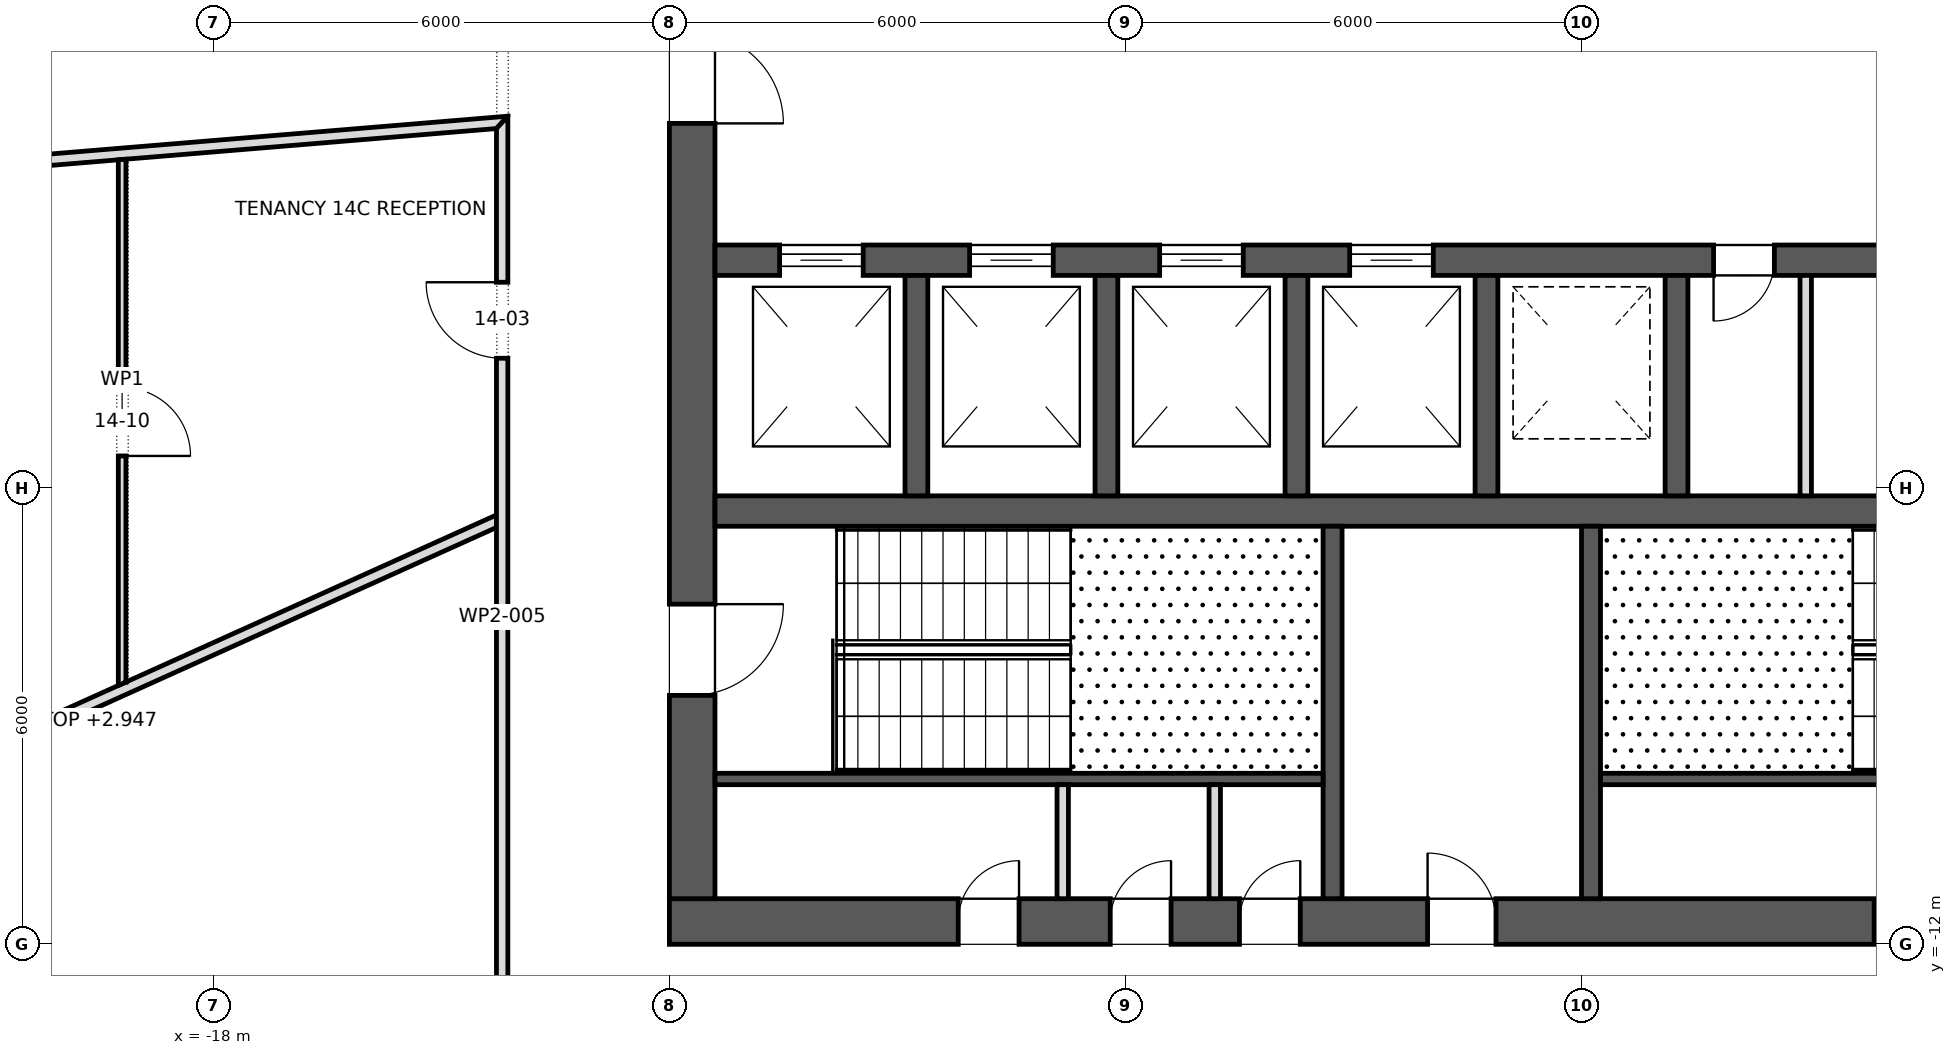
"""IFC4 building model, lengths in metres.
Left out: names, types, materials, properties, quantities, classifications, styles, units other than length and angle.
Written with IfcOpenShell. Run it as: python <this file> out.ifc"""

import sys

from ifc_helpers import new_model, si_unit, direction, frame, frame_2d, origin, place, context, subcontext, project, spatial, polyline, rectangle, outline, extrude, element, fill, save


model = new_model("IFC4")
c1 = context("Model", 3, precision=1e-05, world=origin(), true_north=direction((0.0, 1.0)))
c2 = subcontext(c1, "Body", "Model", "MODEL_VIEW")
j1 = project(units=[si_unit("LENGTHUNIT", "METRE"), si_unit("PLANEANGLEUNIT", "RADIAN")], contexts=[c1])
p1 = place(None, origin())
s1 = spatial("IfcSite", under=j1, at=p1, CompositionType="ELEMENT")
p2 = place(p1, origin())
s2 = spatial("IfcBuilding", under=s1, at=p2, CompositionType="ELEMENT")
p3 = place(p2, frame((0.0, 0.0, 202.9)))
s3 = spatial("IfcBuildingStorey", under=s2, at=p3, CompositionType="ELEMENT", Elevation=202.9)
p4 = place(p3, frame((-12.0, -11.7, 0.0), z_axis=(0.0, 0.0, 1.0), x_axis=(1.0, 0.0, 0.0)))
e1 = element("IfcWall", 1, at=p4, inside=s3, PredefinedType="SHEAR", context=c2, shape_type="SweptSolid", body=[
    extrude(rectangle(XDim=24.0, YDim=0.6, at=frame_2d((12.0, 0.0))), origin(), (0.0, 0.0, 1.0), 4.0),
])
p5 = place(p4, frame((9.975, 0.0, 0.0)))
e2 = element("IfcOpeningElement", 2, at=p5, cuts=e1, PredefinedType="OPENING", context=c2, shape_type="SweptSolid", body=[
    extrude(rectangle(XDim=0.9, YDim=2.1, at=frame_2d((0.45, 1.05))), frame((0.0, 0.312, 0.0), z_axis=(0.0, -1.0, 0.0), x_axis=(1.0, 0.0, 0.0)), (0.0, 0.0, 1.0), 0.624),
])
p6 = place(p4, frame((3.8, 0.0, 0.0)))
e3 = element("IfcOpeningElement", 3, at=p6, cuts=e1, PredefinedType="OPENING", context=c2, shape_type="SweptSolid", body=[
    extrude(rectangle(XDim=0.8, YDim=2.1, at=frame_2d((0.4, 1.05))), frame((0.0, 0.312, 0.0), z_axis=(0.0, -1.0, 0.0), x_axis=(1.0, 0.0, 0.0)), (0.0, 0.0, 1.0), 0.624),
])
p7 = place(p4, frame((5.8, 0.0, 0.0)))
e4 = element("IfcOpeningElement", 4, at=p7, cuts=e1, PredefinedType="OPENING", context=c2, shape_type="SweptSolid", body=[
    extrude(rectangle(XDim=0.8, YDim=2.1, at=frame_2d((0.4, 1.05))), frame((0.0, 0.312, 0.0), z_axis=(0.0, -1.0, 0.0), x_axis=(1.0, 0.0, 0.0)), (0.0, 0.0, 1.0), 0.624),
])
p8 = place(p4, frame((7.5, 0.0, 0.0)))
e5 = element("IfcOpeningElement", 5, at=p8, cuts=e1, PredefinedType="OPENING", context=c2, shape_type="SweptSolid", body=[
    extrude(rectangle(XDim=0.8, YDim=2.1, at=frame_2d((0.4, 1.05))), frame((0.0, 0.312, 0.0), z_axis=(0.0, -1.0, 0.0), x_axis=(1.0, 0.0, 0.0)), (0.0, 0.0, 1.0), 0.624),
])
p9 = place(p4, frame((15.85, 0.0, 0.0)))
e6 = element("IfcOpeningElement", 6, at=p9, cuts=e1, PredefinedType="OPENING", context=c2, shape_type="SweptSolid", body=[
    extrude(rectangle(XDim=0.8, YDim=2.1, at=frame_2d((0.4, 1.05))), frame((0.0, 0.312, 0.0), z_axis=(0.0, -1.0, 0.0), x_axis=(1.0, 0.0, 0.0)), (0.0, 0.0, 1.0), 0.624),
])
p10 = place(p3, frame((-11.7, -11.4, 0.0), z_axis=(0.0, 0.0, 1.0), x_axis=(0.0, 1.0, 0.0)))
e7 = element("IfcWall", 7, at=p10, inside=s3, PredefinedType="SHEAR", context=c2, shape_type="SweptSolid", body=[
    extrude(rectangle(XDim=22.8, YDim=0.6, at=frame_2d((11.4, 0.0))), origin(), (0.0, 0.0, 1.0), 4.0),
])
p11 = place(p10, frame((10.2, 0.0, 0.0)))
e8 = element("IfcOpeningElement", 8, at=p11, cuts=e7, PredefinedType="OPENING", context=c2, shape_type="SweptSolid", body=[
    extrude(rectangle(XDim=2.4, YDim=2.1, at=frame_2d((1.2, 1.05))), frame((0.0, 0.312, 0.0), z_axis=(0.0, -1.0, 0.0), x_axis=(1.0, 0.0, 0.0)), (0.0, 0.0, 1.0), 0.624),
])
p12 = place(p10, frame((18.925, 0.0, 0.0)))
e9 = element("IfcOpeningElement", 9, at=p12, cuts=e7, PredefinedType="OPENING", context=c2, shape_type="SweptSolid", body=[
    extrude(rectangle(XDim=1.2, YDim=2.1, at=frame_2d((0.6, 1.05))), frame((0.0, 0.312, 0.0), z_axis=(0.0, -1.0, 0.0), x_axis=(1.0, 0.0, 0.0)), (0.0, 0.0, 1.0), 0.624),
])
p13 = place(p10, frame((2.675, 0.0, 0.0)))
e10 = element("IfcOpeningElement", 10, at=p13, cuts=e7, PredefinedType="OPENING", context=c2, shape_type="SweptSolid", body=[
    extrude(rectangle(XDim=1.2, YDim=2.1, at=frame_2d((0.6, 1.05))), frame((0.0, 0.312, 0.0), z_axis=(0.0, -1.0, 0.0), x_axis=(1.0, 0.0, 0.0)), (0.0, 0.0, 1.0), 0.624),
])
p14 = place(p3, frame((-11.4, -3.0, 0.0), z_axis=(0.0, 0.0, 1.0), x_axis=(1.0, 0.0, 0.0)))
e11 = element("IfcWall", 11, at=p14, inside=s3, PredefinedType="SHEAR", context=c2, shape_type="SweptSolid", body=[
    extrude(rectangle(XDim=22.8, YDim=0.4, at=frame_2d((11.4, 0.0))), origin(), (0.0, 0.0, 1.0), 4.0),
])
p15 = place(p14, frame((0.85, 0.0, 0.0)))
e12 = element("IfcOpeningElement", 12, at=p15, cuts=e11, PredefinedType="OPENING", context=c2, shape_type="SweptSolid", body=[
    extrude(rectangle(XDim=1.1, YDim=2.1, at=frame_2d((0.55, 1.05))), frame((0.0, 0.212, 0.0), z_axis=(0.0, -1.0, 0.0), x_axis=(1.0, 0.0, 0.0)), (0.0, 0.0, 1.0), 0.424),
])
p16 = place(p14, frame((3.35, 0.0, 0.0)))
e13 = element("IfcOpeningElement", 13, at=p16, cuts=e11, PredefinedType="OPENING", context=c2, shape_type="SweptSolid", body=[
    extrude(rectangle(XDim=1.1, YDim=2.1, at=frame_2d((0.55, 1.05))), frame((0.0, 0.212, 0.0), z_axis=(0.0, -1.0, 0.0), x_axis=(1.0, 0.0, 0.0)), (0.0, 0.0, 1.0), 0.424),
])
p17 = place(p14, frame((5.85, 0.0, 0.0)))
e14 = element("IfcOpeningElement", 14, at=p17, cuts=e11, PredefinedType="OPENING", context=c2, shape_type="SweptSolid", body=[
    extrude(rectangle(XDim=1.1, YDim=2.1, at=frame_2d((0.55, 1.05))), frame((0.0, 0.212, 0.0), z_axis=(0.0, -1.0, 0.0), x_axis=(1.0, 0.0, 0.0)), (0.0, 0.0, 1.0), 0.424),
])
p18 = place(p14, frame((8.35, 0.0, 0.0)))
e15 = element("IfcOpeningElement", 15, at=p18, cuts=e11, PredefinedType="OPENING", context=c2, shape_type="SweptSolid", body=[
    extrude(rectangle(XDim=1.1, YDim=2.1, at=frame_2d((0.55, 1.05))), frame((0.0, 0.212, 0.0), z_axis=(0.0, -1.0, 0.0), x_axis=(1.0, 0.0, 0.0)), (0.0, 0.0, 1.0), 0.424),
])
p19 = place(p14, frame((18.35, 0.0, 0.0)))
e16 = element("IfcOpeningElement", 16, at=p19, cuts=e11, PredefinedType="OPENING", context=c2, shape_type="SweptSolid", body=[
    extrude(rectangle(XDim=1.1, YDim=2.1, at=frame_2d((0.55, 1.05))), frame((0.0, 0.212, 0.0), z_axis=(0.0, -1.0, 0.0), x_axis=(1.0, 0.0, 0.0)), (0.0, 0.0, 1.0), 0.424),
])
p20 = place(p14, frame((13.137, 0.0, 0.0)))
e17 = element("IfcOpeningElement", 17, at=p20, cuts=e11, PredefinedType="OPENING", context=c2, shape_type="SweptSolid", body=[
    extrude(rectangle(XDim=0.8, YDim=2.1, at=frame_2d((0.4, 1.05))), frame((0.0, 0.212, 0.0), z_axis=(0.0, -1.0, 0.0), x_axis=(1.0, 0.0, 0.0)), (0.0, 0.0, 1.0), 0.424),
])
p21 = place(p14, frame((15.512, 0.0, 0.0)))
e18 = element("IfcOpeningElement", 18, at=p21, cuts=e11, PredefinedType="OPENING", context=c2, shape_type="SweptSolid", body=[
    extrude(rectangle(XDim=0.9, YDim=2.1, at=frame_2d((0.45, 1.05))), frame((0.0, 0.212, 0.0), z_axis=(0.0, -1.0, 0.0), x_axis=(1.0, 0.0, 0.0)), (0.0, 0.0, 1.0), 0.424),
])
p22 = place(p3, frame((-11.4, -6.3, 0.0), z_axis=(0.0, 0.0, 1.0), x_axis=(1.0, 0.0, 0.0)))
e19 = element("IfcWall", 19, at=p22, inside=s3, PredefinedType="SHEAR", context=c2, shape_type="SweptSolid", body=[
    extrude(rectangle(XDim=22.8, YDim=0.4, at=frame_2d((11.4, 0.0))), origin(), (0.0, 0.0, 1.0), 4.0),
])
p23 = place(p22, frame((20.85, 0.0, 0.0)))
e20 = element("IfcOpeningElement", 20, at=p23, cuts=e19, PredefinedType="OPENING", context=c2, shape_type="SweptSolid", body=[
    extrude(rectangle(XDim=1.1, YDim=2.1, at=frame_2d((0.55, 1.05))), frame((0.0, 0.212, 0.0), z_axis=(0.0, -1.0, 0.0), x_axis=(1.0, 0.0, 0.0)), (0.0, 0.0, 1.0), 0.424),
])
for number, where, z_axis, x_axis in (
    (21, (-8.75, -6.1, 0.0), (0.0, 0.0, 1.0), (0.0, 1.0, 0.0)),
    (22, (-6.25, -6.1, 0.0), (0.0, 0.0, 1.0), (0.0, 1.0, 0.0)),
    (23, (-3.75, -6.1, 0.0), (0.0, 0.0, 1.0), (0.0, 1.0, 0.0)),
    (24, (-1.25, -6.1, 0.0), (0.0, 0.0, 1.0), (0.0, 1.0, 0.0)),
    (25, (1.25, -6.1, 0.0), (0.0, 0.0, 1.0), (0.0, 1.0, 0.0)),
):
    element("IfcWall", number, at=place(p3, frame(where, z_axis=z_axis, x_axis=x_axis)), inside=s3, PredefinedType="SHEAR", context=c2, shape_type="SweptSolid", body=[
        extrude(rectangle(XDim=2.9, YDim=0.3, at=frame_2d((1.45, 0.0))), origin(), (0.0, 0.0, 1.0), 4.0),
    ])
for number, where, z_axis, x_axis in (
    (26, (-3.275, -11.4, 0.0), (0.0, 0.0, 1.0), (0.0, 1.0, 0.0)),
    (27, (0.125, -11.4, 0.0), (0.0, 0.0, 1.0), (0.0, 1.0, 0.0)),
):
    element("IfcWall", number, at=place(p3, frame(where, z_axis=z_axis, x_axis=x_axis)), inside=s3, PredefinedType="SHEAR", context=c2, shape_type="SweptSolid", body=[
        extrude(rectangle(XDim=4.9, YDim=0.25, at=frame_2d((2.45, 0.0))), origin(), (0.0, 0.0, 1.0), 3.7),
    ])
for number, where, z_axis, x_axis in (
    (28, (-11.4, -9.825, 0.0), (0.0, 0.0, 1.0), (1.0, 0.0, 0.0)),
    (29, (0.25, -9.825, 0.0), (0.0, 0.0, 1.0), (1.0, 0.0, 0.0)),
):
    element("IfcWall", number, at=place(p3, frame(where, z_axis=z_axis, x_axis=x_axis)), inside=s3, PredefinedType="SHEAR", context=c2, shape_type="SweptSolid", body=[
        extrude(rectangle(XDim=8.0, YDim=0.15, at=frame_2d((4.0, 0.0))), origin(), (0.0, 0.0, 1.0), 3.7),
    ])
for number, where, z_axis, x_axis in (
    (30, (-6.825, -11.4, 0.0), (0.0, 0.0, 1.0), (0.0, 1.0, 0.0)),
    (31, (-4.825, -11.4, 0.0), (0.0, 0.0, 1.0), (0.0, 1.0, 0.0)),
):
    element("IfcWall", number, at=place(p3, frame(where, z_axis=z_axis, x_axis=x_axis)), inside=s3, PredefinedType="PARTITIONING", context=c2, shape_type="SweptSolid", body=[
        extrude(rectangle(XDim=1.5, YDim=0.15, at=frame_2d((0.75, 0.0))), origin(), (0.0, 0.0, 1.0), 3.7),
    ])
p24 = place(p3, frame((2.95, -6.1, 0.0), z_axis=(0.0, 0.0, 1.0), x_axis=(0.0, 1.0, 0.0)))
e32 = element("IfcWall", 32, at=p24, inside=s3, PredefinedType="PARTITIONING", context=c2, shape_type="SweptSolid", body=[
    extrude(rectangle(XDim=2.9, YDim=0.15, at=frame_2d((1.45, 0.0))), origin(), (0.0, 0.0, 1.0), 3.7),
])
p25 = place(p3, frame((-29.288, -2.434, 0.0), z_axis=(0.0, 0.0, 1.0), x_axis=(0.9965984313, 0.082410962436, 0.0)))
e33 = element("IfcWall", 33, at=p25, inside=s3, PredefinedType="PARTITIONING", context=c2, shape_type="SweptSolid", body=[
    extrude(outline(polyline([(0.005, -0.075), (1.886, -0.075), (3.768, -0.075), (5.65, -0.075), (7.531, -0.075), (9.413, -0.075), (11.295, -0.075), (13.177, -0.075), (15.059, -0.075), (15.221, 0.075), (15.221, 0.075), (13.319, 0.075), (11.416, 0.075), (9.513, 0.075), (7.611, 0.075), (5.708, 0.075), (3.805, 0.075), (1.903, 0.075), (0.0, 0.075), (0.0, -0.044), (0.005, -0.075)])), origin(), (0.0, 0.0, 1.0), 2.71),
])
p26 = place(p3, frame((-25.963, -11.705, 0.0), z_axis=(0.0, 0.0, 1.0), x_axis=(0.911586477794, 0.41110837197, 0.0)))
e34 = element("IfcWall", 34, at=p26, inside=s3, PredefinedType="PARTITIONING", context=c2, shape_type="SweptSolid", body=[
    extrude(outline(polyline([(0.021, -0.075), (1.844, -0.075), (3.668, -0.075), (5.492, -0.075), (7.316, -0.075), (9.14, -0.075), (10.964, -0.075), (12.788, -0.075), (12.856, 0.075), (11.073, 0.075), (9.291, 0.075), (7.508, 0.075), (7.507, 0.073), (7.502, 0.075), (5.627, 0.075), (3.751, 0.075), (1.875, 0.075), (0.0, 0.075), (0.0, 0.062), (0.002, -0.001), (0.021, -0.075)])), origin(), (0.0, 0.0, 1.0), 2.947),
])
p27 = place(p3, frame((-19.2, -8.595, 0.0), z_axis=(0.0, 0.0, 1.0), x_axis=(0.0, 1.0, 0.0)))
e35 = element("IfcWall", 35, at=p27, inside=s3, PredefinedType="PARTITIONING", context=c2, shape_type="SweptSolid", body=[
    extrude(outline(polyline([(6.924, -0.05), (6.924, -0.047), (6.916, 0.05), (5.187, 0.05), (3.458, 0.05), (1.729, 0.05), (0.0, 0.05), (0.0, 0.05), (0.045, -0.05), (1.765, -0.05), (3.484, -0.05), (5.204, -0.05), (6.924, -0.05)])), origin(), (0.0, 0.0, 1.0), 3.7),
])
p28 = place(p27, frame((3.02, 0.0, 0.0)))
e36 = element("IfcOpeningElement", 36, at=p28, cuts=e35, PredefinedType="OPENING", context=c2, shape_type="SweptSolid", body=[
    extrude(rectangle(XDim=0.9, YDim=2.1, at=frame_2d((0.45, 1.05))), frame((0.0, 0.062, 0.0), z_axis=(0.0, -1.0, 0.0), x_axis=(1.0, 0.0, 0.0)), (0.0, 0.0, 1.0), 0.124),
])
p29 = place(p3, frame((-14.2, -14.275, 0.0), z_axis=(0.0, 0.0, 1.0), x_axis=(0.0, 1.0, 0.0)))
e37 = element("IfcWall", 37, at=p29, inside=s3, PredefinedType="PARTITIONING", context=c2, shape_type="SweptSolid", body=[
    extrude(outline(polyline([(0.15, -0.075), (2.01, -0.075), (3.87, -0.075), (5.73, -0.075), (7.59, -0.075), (9.45, -0.075), (11.31, -0.075), (13.17, -0.075), (13.007, 0.075), (11.149, 0.075), (9.291, 0.075), (7.433, 0.075), (5.574, 0.075), (3.716, 0.075), (1.858, 0.075), (0.0, 0.075), (0.15, -0.075)])), origin(), (0.0, 0.0, 1.0), 3.7),
])
p30 = place(p29, frame((9.985, 0.0, 0.0)))
e38 = element("IfcOpeningElement", 38, at=p30, cuts=e37, PredefinedType="OPENING", context=c2, shape_type="SweptSolid", body=[
    extrude(rectangle(XDim=1.0, YDim=2.1, at=frame_2d((0.5, 1.05))), frame((0.0, 0.087, 0.0), z_axis=(0.0, -1.0, 0.0), x_axis=(1.0, 0.0, 0.0)), (0.0, 0.0, 1.0), 0.174),
])
p31 = place(p15, origin())
e39 = element("IfcDoor", 39, at=p31, inside=s3, OperationType="SLIDING_TO_LEFT", PredefinedType="DOOR", context=c2, shape_type="SweptSolid", body=[
    extrude(rectangle(XDim=1.1, YDim=2.1, at=frame_2d((0.55, 1.05))), frame((0.0, 0.025, 0.0), z_axis=(0.0, -1.0, 0.0), x_axis=(1.0, 0.0, 0.0)), (0.0, 0.0, 1.0), 0.05),
])
fill(e12, e39)
p32 = place(p16, origin())
e40 = element("IfcDoor", 40, at=p32, inside=s3, OperationType="SLIDING_TO_LEFT", PredefinedType="DOOR", context=c2, shape_type="SweptSolid", body=[
    extrude(rectangle(XDim=1.1, YDim=2.1, at=frame_2d((0.55, 1.05))), frame((0.0, 0.025, 0.0), z_axis=(0.0, -1.0, 0.0), x_axis=(1.0, 0.0, 0.0)), (0.0, 0.0, 1.0), 0.05),
])
fill(e13, e40)
p33 = place(p17, origin())
e41 = element("IfcDoor", 41, at=p33, inside=s3, OperationType="SLIDING_TO_LEFT", PredefinedType="DOOR", context=c2, shape_type="SweptSolid", body=[
    extrude(rectangle(XDim=1.1, YDim=2.1, at=frame_2d((0.55, 1.05))), frame((0.0, 0.025, 0.0), z_axis=(0.0, -1.0, 0.0), x_axis=(1.0, 0.0, 0.0)), (0.0, 0.0, 1.0), 0.05),
])
fill(e14, e41)
p34 = place(p18, origin())
e42 = element("IfcDoor", 42, at=p34, inside=s3, OperationType="SLIDING_TO_LEFT", PredefinedType="DOOR", context=c2, shape_type="SweptSolid", body=[
    extrude(rectangle(XDim=1.1, YDim=2.1, at=frame_2d((0.55, 1.05))), frame((0.0, 0.025, 0.0), z_axis=(0.0, -1.0, 0.0), x_axis=(1.0, 0.0, 0.0)), (0.0, 0.0, 1.0), 0.05),
])
fill(e15, e42)
p35 = place(p11, frame((2.4, 0.0, 0.0), z_axis=(0.0, 0.0, 1.0), x_axis=(-1.0, 0.0, 0.0)))
e43 = element("IfcDoor", 43, at=p35, inside=s3, OperationType="DOUBLE_DOOR_SINGLE_SWING", PredefinedType="DOOR", context=c2, shape_type="SweptSolid", body=[
    extrude(rectangle(XDim=2.4, YDim=2.1, at=frame_2d((1.2, 1.05))), frame((0.0, 0.025, 0.0), z_axis=(0.0, -1.0, 0.0), x_axis=(1.0, 0.0, 0.0)), (0.0, 0.0, 1.0), 0.05),
])
fill(e8, e43)
p36 = place(p13, frame((1.2, 0.0, 0.0), z_axis=(0.0, 0.0, 1.0), x_axis=(-1.0, 0.0, 0.0)))
e44 = element("IfcDoor", 44, at=p36, inside=s3, OperationType="SINGLE_SWING_RIGHT", PredefinedType="DOOR", context=c2, shape_type="SweptSolid", body=[
    extrude(rectangle(XDim=1.2, YDim=2.1, at=frame_2d((0.6, 1.05))), frame((0.0, 0.025, 0.0), z_axis=(0.0, -1.0, 0.0), x_axis=(1.0, 0.0, 0.0)), (0.0, 0.0, 1.0), 0.05),
])
fill(e10, e44)
p37 = place(p5, origin())
e45 = element("IfcDoor", 45, at=p37, inside=s3, OperationType="SINGLE_SWING_RIGHT", PredefinedType="DOOR", context=c2, shape_type="SweptSolid", body=[
    extrude(rectangle(XDim=0.9, YDim=2.1, at=frame_2d((0.45, 1.05))), frame((0.0, 0.025, 0.0), z_axis=(0.0, -1.0, 0.0), x_axis=(1.0, 0.0, 0.0)), (0.0, 0.0, 1.0), 0.05),
])
fill(e2, e45)
p38 = place(p6, origin())
e46 = element("IfcDoor", 46, at=p38, inside=s3, OperationType="SINGLE_SWING_LEFT", PredefinedType="DOOR", context=c2, shape_type="SweptSolid", body=[
    extrude(rectangle(XDim=0.8, YDim=2.1, at=frame_2d((0.4, 1.05))), frame((0.0, 0.025, 0.0), z_axis=(0.0, -1.0, 0.0), x_axis=(1.0, 0.0, 0.0)), (0.0, 0.0, 1.0), 0.05),
])
fill(e3, e46)
p39 = place(p7, origin())
e47 = element("IfcDoor", 47, at=p39, inside=s3, OperationType="SINGLE_SWING_LEFT", PredefinedType="DOOR", context=c2, shape_type="SweptSolid", body=[
    extrude(rectangle(XDim=0.8, YDim=2.1, at=frame_2d((0.4, 1.05))), frame((0.0, 0.025, 0.0), z_axis=(0.0, -1.0, 0.0), x_axis=(1.0, 0.0, 0.0)), (0.0, 0.0, 1.0), 0.05),
])
fill(e4, e47)
p40 = place(p8, origin())
e48 = element("IfcDoor", 48, at=p40, inside=s3, OperationType="SINGLE_SWING_LEFT", PredefinedType="DOOR", context=c2, shape_type="SweptSolid", body=[
    extrude(rectangle(XDim=0.8, YDim=2.1, at=frame_2d((0.4, 1.05))), frame((0.0, 0.025, 0.0), z_axis=(0.0, -1.0, 0.0), x_axis=(1.0, 0.0, 0.0)), (0.0, 0.0, 1.0), 0.05),
])
fill(e5, e48)
p41 = place(p9, origin())
e49 = element("IfcDoor", 49, at=p41, inside=s3, OperationType="SINGLE_SWING_LEFT", PredefinedType="DOOR", context=c2, shape_type="SweptSolid", body=[
    extrude(rectangle(XDim=0.8, YDim=2.1, at=frame_2d((0.4, 1.05))), frame((0.0, 0.025, 0.0), z_axis=(0.0, -1.0, 0.0), x_axis=(1.0, 0.0, 0.0)), (0.0, 0.0, 1.0), 0.05),
])
fill(e6, e49)
p42 = place(p20, frame((0.8, 0.0, 0.0), z_axis=(0.0, 0.0, 1.0), x_axis=(-1.0, 0.0, 0.0)))
e50 = element("IfcDoor", 50, at=p42, inside=s3, OperationType="SINGLE_SWING_LEFT", PredefinedType="DOOR", context=c2, shape_type="SweptSolid", body=[
    extrude(rectangle(XDim=0.8, YDim=2.1, at=frame_2d((0.4, 1.05))), frame((0.0, 0.025, 0.0), z_axis=(0.0, -1.0, 0.0), x_axis=(1.0, 0.0, 0.0)), (0.0, 0.0, 1.0), 0.05),
])
fill(e17, e50)
p43 = place(p30, origin())
e51 = element("IfcDoor", 51, at=p43, inside=s3, OperationType="SINGLE_SWING_LEFT", PredefinedType="DOOR", context=c2, shape_type="SweptSolid", body=[
    extrude(rectangle(XDim=1.0, YDim=2.1, at=frame_2d((0.5, 1.05))), frame((0.0, 0.025, 0.0), z_axis=(0.0, -1.0, 0.0), x_axis=(1.0, 0.0, 0.0)), (0.0, 0.0, 1.0), 0.05),
])
fill(e38, e51)
p44 = place(p28, frame((0.9, 0.0, 0.0), z_axis=(0.0, 0.0, 1.0), x_axis=(-1.0, 0.0, 0.0)))
e52 = element("IfcDoor", 52, at=p44, inside=s3, OperationType="SINGLE_SWING_LEFT", PredefinedType="DOOR", context=c2, shape_type="SweptSolid", body=[
    extrude(rectangle(XDim=0.9, YDim=2.1, at=frame_2d((0.45, 1.05))), frame((0.0, 0.025, 0.0), z_axis=(0.0, -1.0, 0.0), x_axis=(1.0, 0.0, 0.0)), (0.0, 0.0, 1.0), 0.05),
])
fill(e36, e52)
save(model, sys.argv[1])
